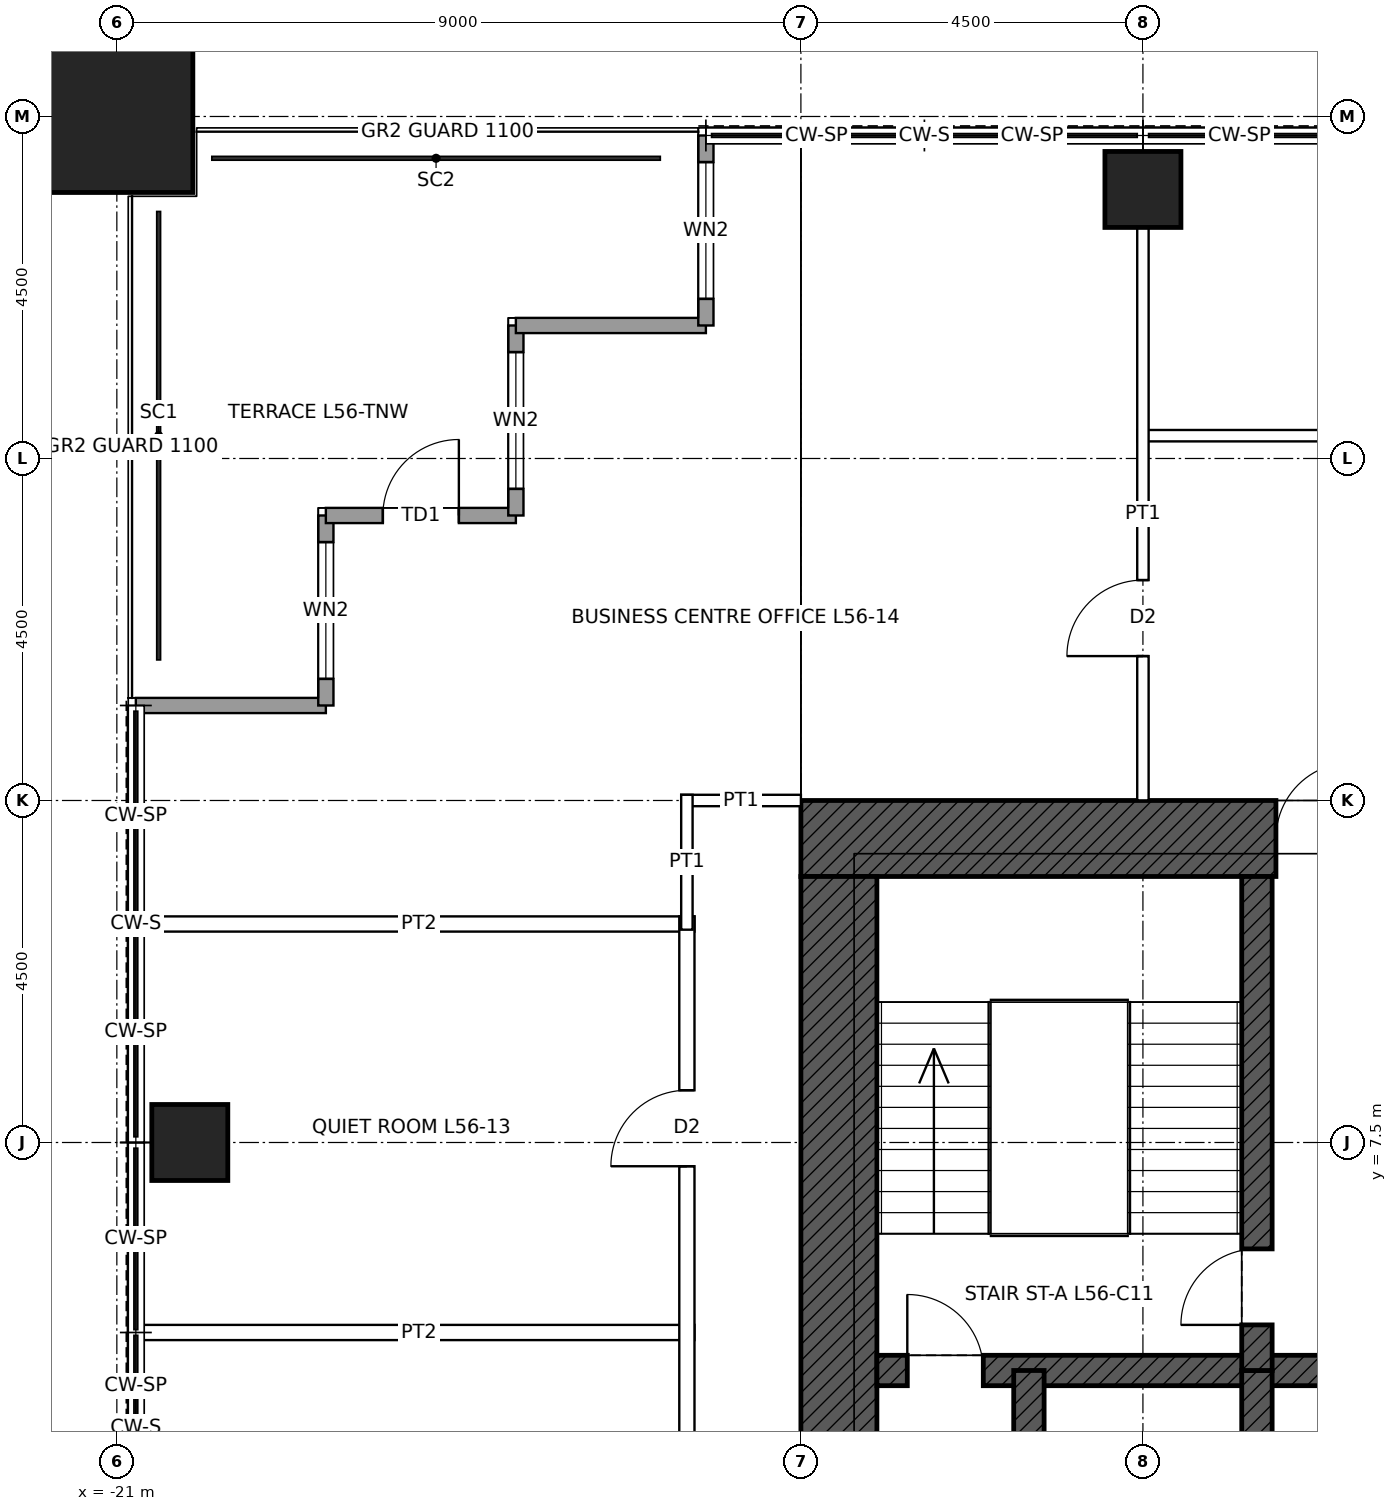
"""IFC4 building model, lengths in metres.
Left out: names, types, materials, properties, quantities, classifications, styles, units other than length and angle.
Written with IfcOpenShell. Run it as: python <this file> out.ifc"""

import sys

from ifc_helpers import new_model, si_unit, direction, frame, frame_2d, origin, origin_2d, place, context, subcontext, project, spatial, rectangle, hollow_rectangle, extrude, element, fill, save


model = new_model("IFC4")
c1 = context("Model", 3, precision=1e-05, world=origin(), true_north=direction((0.0, 1.0)))
c2 = subcontext(c1, "Body", "Model", "MODEL_VIEW")
j1 = project(units=[si_unit("LENGTHUNIT", "METRE"), si_unit("PLANEANGLEUNIT", "RADIAN")], contexts=[c1])
p1 = place(None, origin())
s1 = spatial("IfcSite", under=j1, at=p1, CompositionType="ELEMENT")
p2 = place(p1, origin())
s2 = spatial("IfcBuilding", under=s1, at=p2, CompositionType="ELEMENT")
p3 = place(p2, frame((0.0, 0.0, 259.9)))
s3 = spatial("IfcBuildingStorey", under=s2, at=p3, CompositionType="ELEMENT", Elevation=259.9)
p4 = place(p3, frame((-21.0, 21.0, 0.0), z_axis=(0.0, 0.0, 1.0), x_axis=(1.0, 0.0, 0.0)))
e1 = element("IfcColumn", 1, at=p4, inside=s3, PredefinedType="COLUMN", context=c2, shape_type="SweptSolid", body=[
    extrude(hollow_rectangle(XDim=2.0, YDim=2.0, WallThickness=0.095, at=origin_2d()), origin(), (0.0, 0.0, 1.0), 4.0),
])
for number, where, z_axis, x_axis in (
    (2, (-7.5, 20.04, 0.0), (0.0, 0.0, 1.0), (1.0, 0.0, 0.0)),
    (3, (-20.04, 7.5, 0.0), (0.0, 0.0, 1.0), (1.0, 0.0, 0.0)),
):
    element("IfcColumn", number, at=place(p3, frame(where, z_axis=z_axis, x_axis=x_axis)), inside=s3, PredefinedType="COLUMN", context=c2, shape_type="SweptSolid", body=[
        extrude(hollow_rectangle(XDim=1.0, YDim=1.0, WallThickness=0.075, at=origin_2d()), origin(), (0.0, 0.0, 1.0), 4.0),
    ])
p5 = place(p3, frame((-12.0, 11.5, 0.0), z_axis=(0.0, 0.0, 1.0), x_axis=(1.0, 0.0, 0.0)))
e4 = element("IfcWall", 4, at=p5, inside=s3, PredefinedType="SHEAR", context=c2, shape_type="SweptSolid", body=[
    extrude(rectangle(XDim=24.0, YDim=1.0, at=frame_2d((12.0, 0.0))), origin(), (0.0, 0.0, 1.0), 4.0),
])
p6 = place(p5, frame((6.25, 0.0, 0.0)))
e5 = element("IfcOpeningElement", 5, at=p6, cuts=e4, PredefinedType="OPENING", context=c2, shape_type="SweptSolid", body=[
    extrude(rectangle(XDim=1.0, YDim=2.4, at=frame_2d((0.5, 1.2))), frame((0.0, 0.51, 0.0), z_axis=(0.0, -1.0, 0.0), x_axis=(1.0, 0.0, 0.0)), (0.0, 0.0, 1.0), 1.02),
])
p7 = place(p5, frame((16.75, 0.0, 0.0)))
e6 = element("IfcOpeningElement", 6, at=p7, cuts=e4, PredefinedType="OPENING", context=c2, shape_type="SweptSolid", body=[
    extrude(rectangle(XDim=1.0, YDim=2.4, at=frame_2d((0.5, 1.2))), frame((0.0, 0.51, 0.0), z_axis=(0.0, -1.0, 0.0), x_axis=(1.0, 0.0, 0.0)), (0.0, 0.0, 1.0), 1.02),
])
p8 = place(p3, frame((-11.5, -11.0, 0.0), z_axis=(0.0, 0.0, 1.0), x_axis=(0.0, 1.0, 0.0)))
e7 = element("IfcWall", 7, at=p8, inside=s3, PredefinedType="SHEAR", context=c2, shape_type="SweptSolid", body=[
    extrude(rectangle(XDim=22.0, YDim=1.0, at=frame_2d((11.0, 0.0))), origin(), (0.0, 0.0, 1.0), 4.0),
])
p9 = place(p8, frame((10.5, 0.0, 0.0)))
e8 = element("IfcOpeningElement", 8, at=p9, cuts=e7, PredefinedType="OPENING", context=c2, shape_type="SweptSolid", body=[
    extrude(rectangle(XDim=1.0, YDim=2.4, at=frame_2d((0.5, 1.2))), frame((0.0, 0.51, 0.0), z_axis=(0.0, -1.0, 0.0), x_axis=(1.0, 0.0, 0.0)), (0.0, 0.0, 1.0), 1.02),
])
p10 = place(p3, frame((-11.0, 4.5, 0.0), z_axis=(0.0, 0.0, 1.0), x_axis=(1.0, 0.0, 0.0)))
e9 = element("IfcWall", 9, at=p10, inside=s3, PredefinedType="SHEAR", context=c2, shape_type="SweptSolid", body=[
    extrude(rectangle(XDim=22.0, YDim=0.4, at=frame_2d((11.0, 0.0))), origin(), (0.0, 0.0, 1.0), 4.0),
])
p11 = place(p10, frame((0.4, 0.0, 0.0)))
e10 = element("IfcOpeningElement", 10, at=p11, cuts=e9, PredefinedType="OPENING", context=c2, shape_type="SweptSolid", body=[
    extrude(rectangle(XDim=1.0, YDim=2.1, at=frame_2d((0.5, 1.05))), frame((0.0, 0.21, 0.0), z_axis=(0.0, -1.0, 0.0), x_axis=(1.0, 0.0, 0.0)), (0.0, 0.0, 1.0), 0.42),
])
p12 = place(p10, frame((20.6, 0.0, 0.0)))
e11 = element("IfcOpeningElement", 11, at=p12, cuts=e9, PredefinedType="OPENING", context=c2, shape_type="SweptSolid", body=[
    extrude(rectangle(XDim=1.0, YDim=2.1, at=frame_2d((0.5, 1.05))), frame((0.0, 0.21, 0.0), z_axis=(0.0, -1.0, 0.0), x_axis=(1.0, 0.0, 0.0)), (0.0, 0.0, 1.0), 0.42),
])
for number, where, z_axis, x_axis in (
    (12, (-9.0, 1.5, 0.0), (0.0, 0.0, 1.0), (0.0, 1.0, 0.0)),
    (13, (-6.0, 1.5, 0.0), (0.0, 0.0, 1.0), (0.0, 1.0, 0.0)),
):
    element("IfcWall", number, at=place(p3, frame(where, z_axis=z_axis, x_axis=x_axis)), inside=s3, PredefinedType="SHEAR", context=c2, shape_type="SweptSolid", body=[
        extrude(rectangle(XDim=3.0, YDim=0.4, at=frame_2d((1.5, 0.0))), origin(), (0.0, 0.0, 1.0), 4.0),
    ])
p13 = place(p3, frame((-6.0, 4.5, 0.0), z_axis=(0.0, 0.0, 1.0), x_axis=(0.0, 1.0, 0.0)))
e14 = element("IfcWall", 14, at=p13, inside=s3, PredefinedType="SHEAR", context=c2, shape_type="SweptSolid", body=[
    extrude(rectangle(XDim=6.5, YDim=0.4, at=frame_2d((3.25, 0.0))), origin(), (0.0, 0.0, 1.0), 4.0),
])
p14 = place(p13, frame((0.6, 0.0, 0.0)))
e15 = element("IfcOpeningElement", 15, at=p14, cuts=e14, PredefinedType="OPENING", context=c2, shape_type="SweptSolid", body=[
    extrude(rectangle(XDim=1.0, YDim=2.1, at=frame_2d((0.5, 1.05))), frame((0.0, 0.21, 0.0), z_axis=(0.0, -1.0, 0.0), x_axis=(1.0, 0.0, 0.0)), (0.0, 0.0, 1.0), 0.42),
])
p15 = place(p3, frame((-20.75, 13.25, 0.0), z_axis=(0.0, 0.0, 1.0), x_axis=(1.0, 0.0, 0.0)))
e16 = element("IfcWall", 16, at=p15, inside=s3, PredefinedType="SOLIDWALL", context=c2, shape_type="SweptSolid", body=[
    extrude(rectangle(XDim=2.5, YDim=0.2, at=frame_2d((1.25, 0.0))), origin(), (0.0, 0.0, 1.0), 3.85),
])
p16 = place(p3, frame((-18.25, 13.25, 0.0), z_axis=(0.0, 0.0, 1.0), x_axis=(0.0, 1.0, 0.0)))
e17 = element("IfcWall", 17, at=p16, inside=s3, PredefinedType="SOLIDWALL", context=c2, shape_type="SweptSolid", body=[
    extrude(rectangle(XDim=2.5, YDim=0.2, at=frame_2d((1.25, 0.0))), origin(), (0.0, 0.0, 1.0), 3.85),
])
p17 = place(p16, frame((0.35, 0.0, 0.3)))
e18 = element("IfcOpeningElement", 18, at=p17, cuts=e17, PredefinedType="OPENING", context=c2, shape_type="SweptSolid", body=[
    extrude(rectangle(XDim=1.8, YDim=2.4, at=frame_2d((0.9, 1.2))), frame((0.0, 0.11, 0.0), z_axis=(0.0, -1.0, 0.0), x_axis=(1.0, 0.0, 0.0)), (0.0, 0.0, 1.0), 0.22),
])
p18 = place(p3, frame((-18.25, 15.75, 0.0), z_axis=(0.0, 0.0, 1.0), x_axis=(1.0, 0.0, 0.0)))
e19 = element("IfcWall", 19, at=p18, inside=s3, PredefinedType="SOLIDWALL", context=c2, shape_type="SweptSolid", body=[
    extrude(rectangle(XDim=2.5, YDim=0.2, at=frame_2d((1.25, 0.0))), origin(), (0.0, 0.0, 1.0), 3.317),
])
p19 = place(p18, frame((0.75, 0.0, 0.0)))
e20 = element("IfcOpeningElement", 20, at=p19, cuts=e19, PredefinedType="OPENING", context=c2, shape_type="SweptSolid", body=[
    extrude(rectangle(XDim=1.0, YDim=2.4, at=frame_2d((0.5, 1.2))), frame((0.0, 0.11, 0.0), z_axis=(0.0, -1.0, 0.0), x_axis=(1.0, 0.0, 0.0)), (0.0, 0.0, 1.0), 0.22),
])
p20 = place(p3, frame((-15.75, 15.75, 0.0), z_axis=(0.0, 0.0, 1.0), x_axis=(0.0, 1.0, 0.0)))
e21 = element("IfcWall", 21, at=p20, inside=s3, PredefinedType="SOLIDWALL", context=c2, shape_type="SweptSolid", body=[
    extrude(rectangle(XDim=2.5, YDim=0.2, at=frame_2d((1.25, 0.0))), origin(), (0.0, 0.0, 1.0), 3.85),
])
p21 = place(p20, frame((0.35, 0.0, 0.3)))
e22 = element("IfcOpeningElement", 22, at=p21, cuts=e21, PredefinedType="OPENING", context=c2, shape_type="SweptSolid", body=[
    extrude(rectangle(XDim=1.8, YDim=2.4, at=frame_2d((0.9, 1.2))), frame((0.0, 0.11, 0.0), z_axis=(0.0, -1.0, 0.0), x_axis=(1.0, 0.0, 0.0)), (0.0, 0.0, 1.0), 0.22),
])
p22 = place(p3, frame((-15.75, 18.25, 0.0), z_axis=(0.0, 0.0, 1.0), x_axis=(1.0, 0.0, 0.0)))
e23 = element("IfcWall", 23, at=p22, inside=s3, PredefinedType="SOLIDWALL", context=c2, shape_type="SweptSolid", body=[
    extrude(rectangle(XDim=2.5, YDim=0.2, at=frame_2d((1.25, 0.0))), origin(), (0.0, 0.0, 1.0), 3.85),
])
p23 = place(p3, frame((-13.25, 18.25, 0.0), z_axis=(0.0, 0.0, 1.0), x_axis=(0.0, 1.0, 0.0)))
e24 = element("IfcWall", 24, at=p23, inside=s3, PredefinedType="SOLIDWALL", context=c2, shape_type="SweptSolid", body=[
    extrude(rectangle(XDim=2.5, YDim=0.2, at=frame_2d((1.25, 0.0))), origin(), (0.0, 0.0, 1.0), 3.85),
])
p24 = place(p23, frame((0.35, 0.0, 0.3)))
e25 = element("IfcOpeningElement", 25, at=p24, cuts=e24, PredefinedType="OPENING", context=c2, shape_type="SweptSolid", body=[
    extrude(rectangle(XDim=1.8, YDim=2.4, at=frame_2d((0.9, 1.2))), frame((0.0, 0.11, 0.0), z_axis=(0.0, -1.0, 0.0), x_axis=(1.0, 0.0, 0.0)), (0.0, 0.0, 1.0), 0.22),
])
for number, where, z_axis, x_axis in (
    (26, (-20.65, 5.0, 0.0), (0.0, 0.0, 1.0), (1.0, 0.0, 0.0)),
    (27, (-20.65, 10.375, 0.0), (0.0, 0.0, 1.0), (1.0, 0.0, 0.0)),
):
    element("IfcWall", number, at=place(p3, frame(where, z_axis=z_axis, x_axis=x_axis)), inside=s3, PredefinedType="PARTITIONING", context=c2, shape_type="SweptSolid", body=[
        extrude(rectangle(XDim=7.25, YDim=0.2, at=frame_2d((3.625, 0.0))), origin(), (0.0, 0.0, 1.0), 3.85),
    ])
p25 = place(p3, frame((-13.575, 12.0, 0.0), z_axis=(0.0, 0.0, 1.0), x_axis=(1.0, 0.0, 0.0)))
e28 = element("IfcWall", 28, at=p25, inside=s3, PredefinedType="PARTITIONING", context=c2, shape_type="SweptSolid", body=[
    extrude(rectangle(XDim=1.575, YDim=0.15, at=frame_2d((0.788, 0.0))), origin(), (0.0, 0.0, 1.0), 3.85),
])
p26 = place(p3, frame((-7.575, 16.8, 0.0), z_axis=(0.0, 0.0, 1.0), x_axis=(1.0, 0.0, 0.0)))
e29 = element("IfcWall", 29, at=p26, inside=s3, PredefinedType="PARTITIONING", context=c2, shape_type="SweptSolid", body=[
    extrude(rectangle(XDim=15.15, YDim=0.15, at=frame_2d((7.575, 0.0))), origin(), (0.0, 0.0, 1.0), 3.85),
])
p27 = place(p26, frame((7.075, 0.0, 0.0)))
e30 = element("IfcOpeningElement", 30, at=p27, cuts=e29, PredefinedType="OPENING", context=c2, shape_type="SweptSolid", body=[
    extrude(rectangle(XDim=1.0, YDim=2.1, at=frame_2d((0.5, 1.05))), frame((0.0, 0.085, 0.0), z_axis=(0.0, -1.0, 0.0), x_axis=(1.0, 0.0, 0.0)), (0.0, 0.0, 1.0), 0.17),
])
p28 = place(p3, frame((-13.5, -5.1, 0.0), z_axis=(0.0, 0.0, 1.0), x_axis=(0.0, 1.0, 0.0)))
e31 = element("IfcWall", 31, at=p28, inside=s3, PredefinedType="PARTITIONING", context=c2, shape_type="SweptSolid", body=[
    extrude(rectangle(XDim=15.575, YDim=0.2, at=frame_2d((7.788, 0.0))), origin(), (0.0, 0.0, 1.0), 3.85),
])
p29 = place(p28, frame((0.5, 0.0, 0.0)))
e32 = element("IfcOpeningElement", 32, at=p29, cuts=e31, PredefinedType="OPENING", context=c2, shape_type="SweptSolid", body=[
    extrude(rectangle(XDim=1.0, YDim=2.1, at=frame_2d((0.5, 1.05))), frame((0.0, 0.11, 0.0), z_axis=(0.0, -1.0, 0.0), x_axis=(1.0, 0.0, 0.0)), (0.0, 0.0, 1.0), 0.22),
])
p30 = place(p28, frame((12.288, 0.0, 0.0)))
e33 = element("IfcOpeningElement", 33, at=p30, cuts=e31, PredefinedType="OPENING", context=c2, shape_type="SweptSolid", body=[
    extrude(rectangle(XDim=1.0, YDim=2.1, at=frame_2d((0.5, 1.05))), frame((0.0, 0.11, 0.0), z_axis=(0.0, -1.0, 0.0), x_axis=(1.0, 0.0, 0.0)), (0.0, 0.0, 1.0), 0.22),
])
p31 = place(p3, frame((-13.5, 10.3, 0.0), z_axis=(0.0, 0.0, 1.0), x_axis=(0.0, 1.0, 0.0)))
e34 = element("IfcWall", 34, at=p31, inside=s3, PredefinedType="PARTITIONING", context=c2, shape_type="SweptSolid", body=[
    extrude(rectangle(XDim=1.775, YDim=0.15, at=frame_2d((0.887, 0.0))), origin(), (0.0, 0.0, 1.0), 3.85),
])
p32 = place(p3, frame((-7.5, 12.0, 0.0), z_axis=(0.0, 0.0, 1.0), x_axis=(0.0, 1.0, 0.0)))
e35 = element("IfcWall", 35, at=p32, inside=s3, PredefinedType="PARTITIONING", context=c2, shape_type="SweptSolid", body=[
    extrude(rectangle(XDim=7.54, YDim=0.15, at=frame_2d((3.77, 0.0))), origin(), (0.0, 0.0, 1.0), 3.243),
])
p33 = place(p32, frame((1.9, 0.0, 0.0)))
e36 = element("IfcOpeningElement", 36, at=p33, cuts=e35, PredefinedType="OPENING", context=c2, shape_type="SweptSolid", body=[
    extrude(rectangle(XDim=1.0, YDim=2.1, at=frame_2d((0.5, 1.05))), frame((0.0, 0.085, 0.0), z_axis=(0.0, -1.0, 0.0), x_axis=(1.0, 0.0, 0.0)), (0.0, 0.0, 1.0), 0.17),
])
p34 = place(p17, origin())
e37 = element("IfcWindow", 37, at=p34, inside=s3, PartitioningType="SINGLE_PANEL", PredefinedType="WINDOW", context=c2, shape_type="SweptSolid", body=[
    extrude(rectangle(XDim=1.8, YDim=2.4, at=frame_2d((0.9, 1.2))), frame((0.0, 0.03, 0.0), z_axis=(0.0, -1.0, 0.0), x_axis=(1.0, 0.0, 0.0)), (0.0, 0.0, 1.0), 0.06),
])
fill(e18, e37)
p35 = place(p19, origin())
e38 = element("IfcDoor", 38, at=p35, inside=s3, OperationType="SINGLE_SWING_RIGHT", PredefinedType="DOOR", context=c2, shape_type="SweptSolid", body=[
    extrude(rectangle(XDim=1.0, YDim=2.4, at=frame_2d((0.5, 1.2))), frame((0.0, 0.025, 0.0), z_axis=(0.0, -1.0, 0.0), x_axis=(1.0, 0.0, 0.0)), (0.0, 0.0, 1.0), 0.05),
])
fill(e20, e38)
p36 = place(p21, origin())
e39 = element("IfcWindow", 39, at=p36, inside=s3, PartitioningType="SINGLE_PANEL", PredefinedType="WINDOW", context=c2, shape_type="SweptSolid", body=[
    extrude(rectangle(XDim=1.8, YDim=2.4, at=frame_2d((0.9, 1.2))), frame((0.0, 0.03, 0.0), z_axis=(0.0, -1.0, 0.0), x_axis=(1.0, 0.0, 0.0)), (0.0, 0.0, 1.0), 0.06),
])
fill(e22, e39)
p37 = place(p24, origin())
e40 = element("IfcWindow", 40, at=p37, inside=s3, PartitioningType="SINGLE_PANEL", PredefinedType="WINDOW", context=c2, shape_type="SweptSolid", body=[
    extrude(rectangle(XDim=1.8, YDim=2.4, at=frame_2d((0.9, 1.2))), frame((0.0, 0.03, 0.0), z_axis=(0.0, -1.0, 0.0), x_axis=(1.0, 0.0, 0.0)), (0.0, 0.0, 1.0), 0.06),
])
fill(e25, e40)
p38 = place(p11, origin())
e41 = element("IfcDoor", 41, at=p38, inside=s3, OperationType="SINGLE_SWING_LEFT", PredefinedType="DOOR", context=c2, shape_type="SweptSolid", body=[
    extrude(rectangle(XDim=1.0, YDim=2.1, at=frame_2d((0.5, 1.05))), frame((0.0, 0.025, 0.0), z_axis=(0.0, -1.0, 0.0), x_axis=(1.0, 0.0, 0.0)), (0.0, 0.0, 1.0), 0.05),
])
fill(e10, e41)
p39 = place(p14, origin())
e42 = element("IfcDoor", 42, at=p39, inside=s3, OperationType="SINGLE_SWING_LEFT", PredefinedType="DOOR", context=c2, shape_type="SweptSolid", body=[
    extrude(rectangle(XDim=1.0, YDim=2.1, at=frame_2d((0.5, 1.05))), frame((0.0, 0.025, 0.0), z_axis=(0.0, -1.0, 0.0), x_axis=(1.0, 0.0, 0.0)), (0.0, 0.0, 1.0), 0.05),
])
fill(e15, e42)
p40 = place(p6, origin())
e43 = element("IfcDoor", 43, at=p40, inside=s3, OperationType="SINGLE_SWING_RIGHT", PredefinedType="DOOR", context=c2, shape_type="SweptSolid", body=[
    extrude(rectangle(XDim=1.0, YDim=2.4, at=frame_2d((0.5, 1.2))), frame((0.0, 0.485, 0.0), z_axis=(0.0, -1.0, 0.0), x_axis=(1.0, 0.0, 0.0)), (0.0, 0.0, 1.0), 0.05),
])
fill(e5, e43)
p41 = place(p30, origin())
e44 = element("IfcDoor", 44, at=p41, inside=s3, OperationType="SINGLE_SWING_LEFT", PredefinedType="DOOR", context=c2, shape_type="SweptSolid", body=[
    extrude(rectangle(XDim=1.0, YDim=2.1, at=frame_2d((0.5, 1.05))), frame((0.0, 0.025, 0.0), z_axis=(0.0, -1.0, 0.0), x_axis=(1.0, 0.0, 0.0)), (0.0, 0.0, 1.0), 0.05),
])
fill(e33, e44)
p42 = place(p33, origin())
e45 = element("IfcDoor", 45, at=p42, inside=s3, OperationType="SINGLE_SWING_LEFT", PredefinedType="DOOR", context=c2, shape_type="SweptSolid", body=[
    extrude(rectangle(XDim=1.0, YDim=2.1, at=frame_2d((0.5, 1.05))), frame((0.0, 0.025, 0.0), z_axis=(0.0, -1.0, 0.0), x_axis=(1.0, 0.0, 0.0)), (0.0, 0.0, 1.0), 0.05),
])
fill(e36, e45)
save(model, sys.argv[1])
